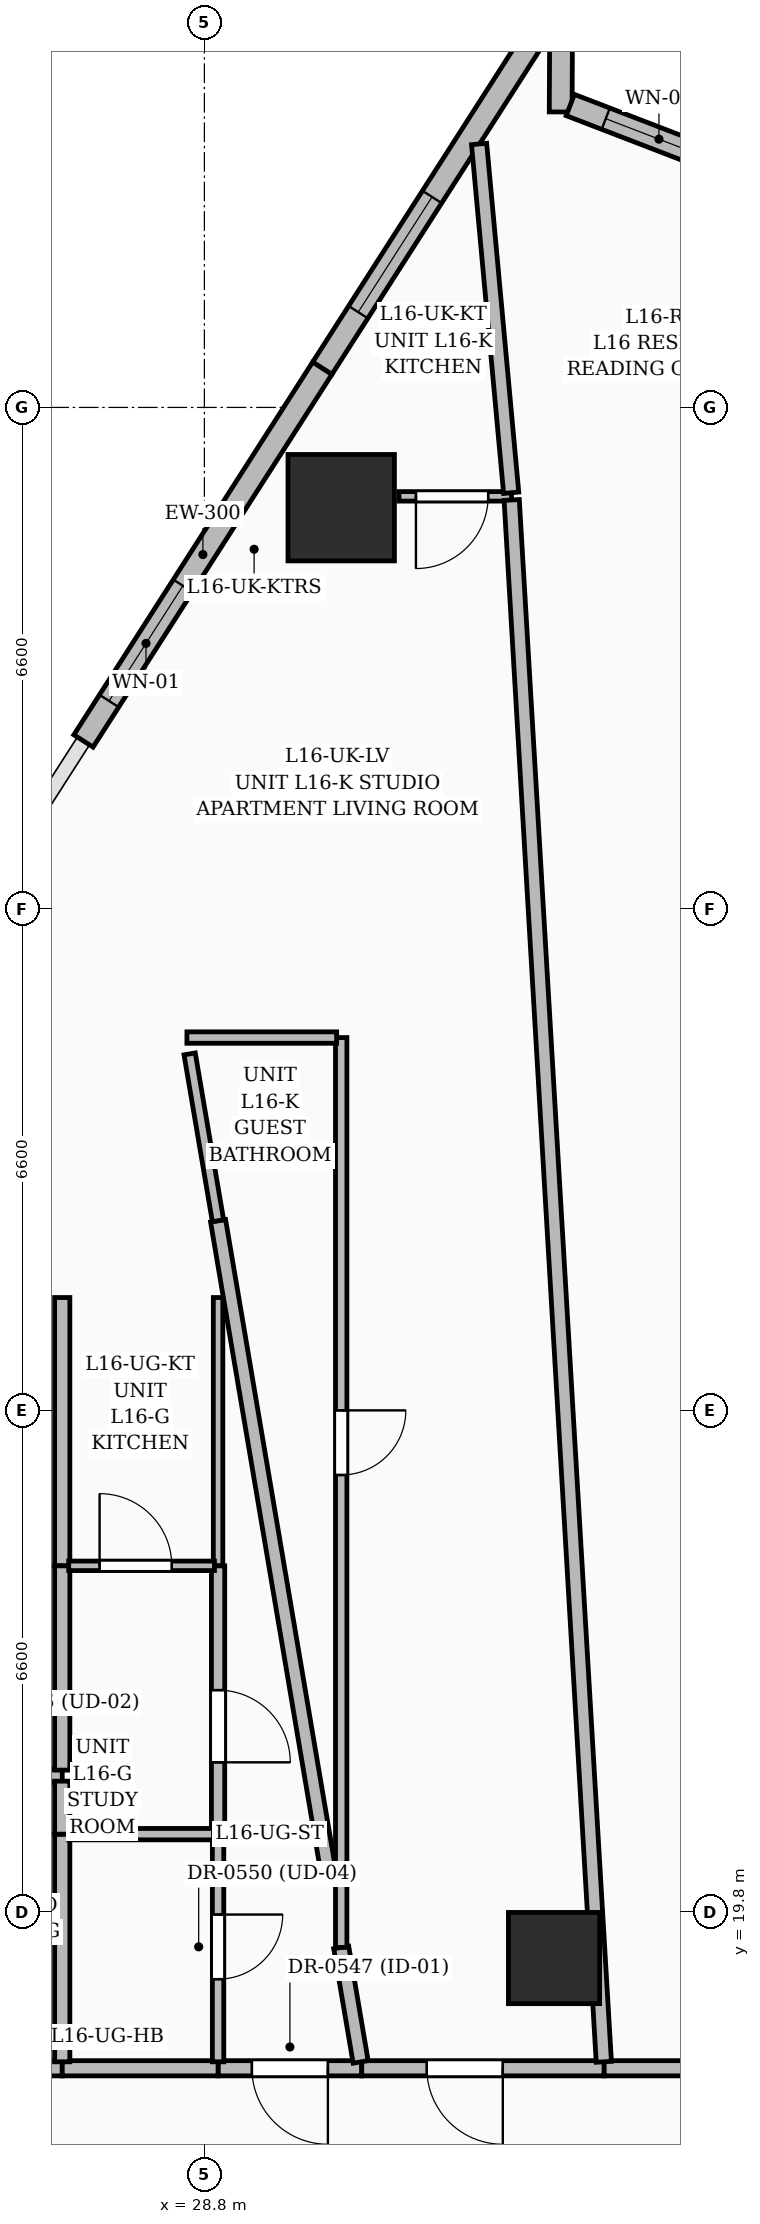
"""IFC4 building model, lengths in metres.
Left out: names, types, materials, properties, quantities, classifications, styles, units other than length and angle.
Written with IfcOpenShell. Run it as: python <this file> out.ifc"""

import sys

from ifc_helpers import new_model, si_unit, direction, frame, frame_2d, origin, origin_2d, place, context, subcontext, project, spatial, rectangle, extrude, element, fill, save


model = new_model("IFC4")
c1 = context("Model", 3, precision=1e-05, world=origin(), true_north=direction((0.0, 1.0)))
c2 = subcontext(c1, "Body", "Model", "MODEL_VIEW")
j1 = project(units=[si_unit("LENGTHUNIT", "METRE"), si_unit("PLANEANGLEUNIT", "RADIAN")], contexts=[c1])
p1 = place(None, origin())
s1 = spatial("IfcSite", under=j1, at=p1, CompositionType="ELEMENT")
p2 = place(p1, origin())
s2 = spatial("IfcBuilding", under=s1, at=p2, CompositionType="ELEMENT")
p3 = place(p2, frame((0.0, 0.0, 67.8)))
s3 = spatial("IfcBuildingStorey", under=s2, at=p3, CompositionType="ELEMENT", Elevation=67.8)
p4 = place(p3, frame((33.4, 19.2, 0.0), z_axis=(0.0, 0.0, 1.0), x_axis=(1.0, 0.0, 0.0)))
e1 = element("IfcColumn", 1, at=p4, inside=s3, PredefinedType="COLUMN", context=c2, shape_type="SweptSolid", body=[
    extrude(rectangle(XDim=1.2, YDim=1.2, at=origin_2d()), origin(), (0.0, 0.0, 1.0), 3.6),
])
p5 = place(p3, frame((30.6, 38.281, 0.0), z_axis=(0.0, 0.0, 1.0), x_axis=(1.0, 0.0, 0.0)))
e2 = element("IfcColumn", 2, at=p5, inside=s3, PredefinedType="COLUMN", context=c2, shape_type="SweptSolid", body=[
    extrude(rectangle(XDim=1.4, YDim=1.4, at=origin_2d()), origin(), (0.0, 0.0, 1.0), 3.6),
])
p6 = place(p3, frame((27.209, 35.212, 0.0), z_axis=(0.0, 0.0, 1.0), x_axis=(0.539522163193, 0.841971398222, 0.0)))
e3 = element("IfcWall", 3, at=p6, inside=s3, PredefinedType="SOLIDWALL", context=c2, shape_type="SweptSolid", body=[
    extrude(rectangle(XDim=5.826, YDim=0.3, at=frame_2d((2.913, 0.0))), origin(), (0.0, 0.0, 1.0), 3.35),
])
p7 = place(p6, frame((0.625, 0.0, 0.6)))
e4 = element("IfcOpeningElement", 4, at=p7, cuts=e3, PredefinedType="OPENING", context=c2, shape_type="SweptSolid", body=[
    extrude(rectangle(XDim=1.8, YDim=2.1, at=frame_2d((0.9, 1.05))), frame((0.0, 0.16, 0.0), z_axis=(0.0, -1.0, 0.0), x_axis=(1.0, 0.0, 0.0)), (0.0, 0.0, 1.0), 0.32),
])
p8 = place(p3, frame((30.352, 40.117, 0.0), z_axis=(0.0, 0.0, 1.0), x_axis=(0.539522163193, 0.841971398222, 0.0)))
e5 = element("IfcWall", 5, at=p8, inside=s3, PredefinedType="SOLIDWALL", context=c2, shape_type="SweptSolid", body=[
    extrude(rectangle(XDim=5.826, YDim=0.3, at=frame_2d((2.913, 0.0))), origin(), (0.0, 0.0, 1.0), 3.35),
])
p9 = place(p8, frame((0.875, 0.0, 0.6)))
e6 = element("IfcOpeningElement", 6, at=p9, cuts=e5, PredefinedType="OPENING", context=c2, shape_type="SweptSolid", body=[
    extrude(rectangle(XDim=1.8, YDim=2.1, at=frame_2d((0.9, 1.05))), frame((0.0, 0.16, 0.0), z_axis=(0.0, -1.0, 0.0), x_axis=(1.0, 0.0, 0.0)), (0.0, 0.0, 1.0), 0.32),
])
p10 = place(p3, frame((33.493, 44.612, 0.0), z_axis=(0.0, 0.0, 1.0), x_axis=(-0.004991257271, -0.999987543598, 0.0)))
e7 = element("IfcWall", 7, at=p10, inside=s3, PredefinedType="SOLIDWALL", context=c2, shape_type="SweptSolid", body=[
    extrude(rectangle(XDim=1.125, YDim=0.3, at=frame_2d((0.562, 0.0))), origin(), (0.0, 0.0, 1.0), 3.35),
])
p11 = place(p3, frame((33.614, 43.579, 0.0), z_axis=(0.0, 0.0, 1.0), x_axis=(0.933166321884, -0.359444871576, 0.0)))
e8 = element("IfcWall", 8, at=p11, inside=s3, PredefinedType="SOLIDWALL", context=c2, shape_type="SweptSolid", body=[
    extrude(rectangle(XDim=2.985, YDim=0.3, at=frame_2d((1.493, 0.0))), origin(), (0.0, 0.0, 1.0), 3.35),
])
p12 = place(p11, frame((0.5, 0.0, 0.6)))
e9 = element("IfcOpeningElement", 9, at=p12, cuts=e8, PredefinedType="OPENING", context=c2, shape_type="SweptSolid", body=[
    extrude(rectangle(XDim=1.5, YDim=2.1, at=frame_2d((0.75, 1.05))), frame((0.0, 0.16, 0.0), z_axis=(0.0, -1.0, 0.0), x_axis=(1.0, 0.0, 0.0)), (0.0, 0.0, 1.0), 0.32),
])
p13 = place(p3, frame((26.93, 17.75, 0.0), z_axis=(0.0, 0.0, 1.0), x_axis=(-1.0, 0.0, 0.0)))
e10 = element("IfcWall", 10, at=p13, inside=s3, PredefinedType="PARTITIONING", context=c2, shape_type="SweptSolid", body=[
    extrude(rectangle(XDim=5.15, YDim=0.2, at=frame_2d((2.575, 0.0))), origin(), (0.0, 0.0, 1.0), 2.279),
])
p14 = place(p13, frame((2.016, 0.0, 0.0)))
e11 = element("IfcOpeningElement", 11, at=p14, cuts=e10, PredefinedType="OPENING", context=c2, shape_type="SweptSolid", body=[
    extrude(rectangle(XDim=1.0, YDim=2.2, at=frame_2d((0.5, 1.1))), frame((0.0, 0.11, 0.0), z_axis=(0.0, -1.0, 0.0), x_axis=(1.0, 0.0, 0.0)), (0.0, 0.0, 1.0), 0.22),
])
p15 = place(p3, frame((30.87, 17.75, 0.0), z_axis=(0.0, 0.0, 1.0), x_axis=(-1.0, 0.0, 0.0)))
e12 = element("IfcWall", 12, at=p15, inside=s3, PredefinedType="PARTITIONING", context=c2, shape_type="SweptSolid", body=[
    extrude(rectangle(XDim=1.89, YDim=0.2, at=frame_2d((0.945, 0.0))), origin(), (0.0, 0.0, 1.0), 3.35),
])
p16 = place(p15, frame((0.445, 0.0, 0.0)))
e13 = element("IfcOpeningElement", 13, at=p16, cuts=e12, PredefinedType="OPENING", context=c2, shape_type="SweptSolid", body=[
    extrude(rectangle(XDim=1.0, YDim=2.2, at=frame_2d((0.5, 1.1))), frame((0.0, 0.11, 0.0), z_axis=(0.0, -1.0, 0.0), x_axis=(1.0, 0.0, 0.0)), (0.0, 0.0, 1.0), 0.22),
])
p17 = place(p3, frame((28.98, 17.75, 0.0), z_axis=(0.0, 0.0, 1.0), x_axis=(-1.0, 0.0, 0.0)))
e14 = element("IfcWall", 14, at=p17, inside=s3, PredefinedType="PARTITIONING", context=c2, shape_type="SweptSolid", body=[
    extrude(rectangle(XDim=2.05, YDim=0.2, at=frame_2d((1.025, 0.0))), origin(), (0.0, 0.0, 1.0), 2.787),
])
p18 = place(p3, frame((34.06, 17.75, 0.0), z_axis=(0.0, 0.0, 1.0), x_axis=(-1.0, 0.0, 0.0)))
e15 = element("IfcWall", 15, at=p18, inside=s3, PredefinedType="PARTITIONING", context=c2, shape_type="SweptSolid", body=[
    extrude(rectangle(XDim=3.19, YDim=0.2, at=frame_2d((1.595, 0.0))), origin(), (0.0, 0.0, 1.0), 2.309),
])
p19 = place(p18, frame((1.334, 0.0, 0.0)))
e16 = element("IfcOpeningElement", 16, at=p19, cuts=e15, PredefinedType="OPENING", context=c2, shape_type="SweptSolid", body=[
    extrude(rectangle(XDim=1.0, YDim=2.2, at=frame_2d((0.5, 1.1))), frame((0.0, 0.11, 0.0), z_axis=(0.0, -1.0, 0.0), x_axis=(1.0, 0.0, 0.0)), (0.0, 0.0, 1.0), 0.22),
])
p20 = place(p3, frame((37.25, 17.75, 0.0), z_axis=(0.0, 0.0, 1.0), x_axis=(-1.0, 0.0, 0.0)))
e17 = element("IfcWall", 17, at=p20, inside=s3, PredefinedType="PARTITIONING", context=c2, shape_type="SweptSolid", body=[
    extrude(rectangle(XDim=3.19, YDim=0.2, at=frame_2d((1.595, 0.0))), origin(), (0.0, 0.0, 1.0), 2.309),
])
p21 = place(p20, frame((1.086, 0.0, 0.0)))
e18 = element("IfcOpeningElement", 18, at=p21, cuts=e17, PredefinedType="OPENING", context=c2, shape_type="SweptSolid", body=[
    extrude(rectangle(XDim=0.9, YDim=2.1, at=frame_2d((0.45, 1.05))), frame((0.0, 0.11, 0.0), z_axis=(0.0, -1.0, 0.0), x_axis=(1.0, 0.0, 0.0)), (0.0, 0.0, 1.0), 0.22),
])
p22 = place(p3, frame((26.93, 21.6, 0.0), z_axis=(0.0, 0.0, 1.0), x_axis=(-1.0, 0.0, 0.0)))
e19 = element("IfcWall", 19, at=p22, inside=s3, PredefinedType="PARTITIONING", context=c2, shape_type="SweptSolid", body=[
    extrude(rectangle(XDim=2.57, YDim=0.175, at=frame_2d((1.285, 0.0))), origin(), (0.0, 0.0, 1.0), 3.35),
])
p23 = place(p22, frame((0.835, 0.0, 0.0)))
e20 = element("IfcOpeningElement", 20, at=p23, cuts=e19, PredefinedType="OPENING", context=c2, shape_type="SweptSolid", body=[
    extrude(rectangle(XDim=0.9, YDim=2.15, at=frame_2d((0.45, 1.075))), frame((0.0, 0.097, 0.0), z_axis=(0.0, -1.0, 0.0), x_axis=(1.0, 0.0, 0.0)), (0.0, 0.0, 1.0), 0.195),
])
p24 = place(p3, frame((26.93, 17.835, 0.0), z_axis=(0.0, 0.0, 1.0), x_axis=(0.0, 1.0, 0.0)))
e21 = element("IfcWall", 21, at=p24, inside=s3, PredefinedType="PARTITIONING", context=c2, shape_type="SweptSolid", body=[
    extrude(rectangle(XDim=2.995, YDim=0.2, at=frame_2d((1.498, 0.0))), origin(), (0.0, 0.0, 1.0), 2.787),
])
p25 = place(p3, frame((26.93, 20.83, 0.0), z_axis=(0.0, 0.0, 1.0), x_axis=(0.0, 1.0, 0.0)))
e22 = element("IfcWall", 22, at=p25, inside=s3, PredefinedType="PARTITIONING", context=c2, shape_type="SweptSolid", body=[
    extrude(rectangle(XDim=0.698, YDim=0.2, at=frame_2d((0.349, 0.0))), origin(), (0.0, 0.0, 1.0), 2.787),
])
p26 = place(p3, frame((26.93, 24.36, 0.0), z_axis=(0.0, 0.0, 1.0), x_axis=(0.0, 1.0, 0.0)))
e23 = element("IfcWall", 23, at=p26, inside=s3, PredefinedType="PARTITIONING", context=c2, shape_type="SweptSolid", body=[
    extrude(rectangle(XDim=3.53, YDim=0.2, at=frame_2d((1.765, 0.0))), origin(), (0.0, 0.0, 1.0), 2.279),
])
p27 = place(p3, frame((26.93, 21.673, 0.0), z_axis=(0.0, 0.0, 1.0), x_axis=(0.0, 1.0, 0.0)))
e24 = element("IfcWall", 24, at=p27, inside=s3, PredefinedType="PARTITIONING", context=c2, shape_type="SweptSolid", body=[
    extrude(rectangle(XDim=2.688, YDim=0.2, at=frame_2d((1.344, 0.0))), origin(), (0.0, 0.0, 1.0), 3.35),
])
p28 = place(p3, frame((28.98, 20.83, 0.0), z_axis=(0.0, 0.0, 1.0), x_axis=(0.0, -1.0, 0.0)))
e25 = element("IfcWall", 25, at=p28, inside=s3, PredefinedType="PARTITIONING", context=c2, shape_type="SweptSolid", body=[
    extrude(rectangle(XDim=2.995, YDim=0.15, at=frame_2d((1.498, 0.0))), origin(), (0.0, 0.0, 1.0), 2.787),
])
p29 = place(p28, frame((1.058, 0.0, 0.0)))
e26 = element("IfcOpeningElement", 26, at=p29, cuts=e25, PredefinedType="OPENING", context=c2, shape_type="SweptSolid", body=[
    extrude(rectangle(XDim=0.85, YDim=2.1, at=frame_2d((0.425, 1.05))), frame((0.0, 0.085, 0.0), z_axis=(0.0, -1.0, 0.0), x_axis=(1.0, 0.0, 0.0)), (0.0, 0.0, 1.0), 0.17),
])
p30 = place(p3, frame((28.98, 27.89, 0.0), z_axis=(0.0, 0.0, 1.0), x_axis=(0.0, -1.0, 0.0)))
e27 = element("IfcWall", 27, at=p30, inside=s3, PredefinedType="PARTITIONING", context=c2, shape_type="SweptSolid", body=[
    extrude(rectangle(XDim=3.53, YDim=0.125, at=frame_2d((1.765, 0.0))), origin(), (0.0, 0.0, 1.0), 3.35),
])
p31 = place(p3, frame((28.98, 24.36, 0.0), z_axis=(0.0, 0.0, 1.0), x_axis=(0.0, -1.0, 0.0)))
e28 = element("IfcWall", 28, at=p31, inside=s3, PredefinedType="PARTITIONING", context=c2, shape_type="SweptSolid", body=[
    extrude(rectangle(XDim=3.53, YDim=0.175, at=frame_2d((1.765, 0.0))), origin(), (0.0, 0.0, 1.0), 2.279),
])
p32 = place(p31, frame((1.635, 0.0, 0.0)))
e29 = element("IfcOpeningElement", 29, at=p32, cuts=e28, PredefinedType="OPENING", context=c2, shape_type="SweptSolid", body=[
    extrude(rectangle(XDim=0.95, YDim=2.2, at=frame_2d((0.475, 1.1))), frame((0.0, 0.097, 0.0), z_axis=(0.0, -1.0, 0.0), x_axis=(1.0, 0.0, 0.0)), (0.0, 0.0, 1.0), 0.195),
])
p33 = place(p3, frame((30.856, 17.834, 0.0), z_axis=(0.0, 0.0, 1.0), x_axis=(-0.167300412549, 0.98590596507, 0.0)))
e30 = element("IfcWall", 30, at=p33, inside=s3, PredefinedType="PARTITIONING", context=c2, shape_type="SweptSolid", body=[
    extrude(rectangle(XDim=1.528, YDim=0.2, at=frame_2d((0.764, 0.0))), origin(), (0.0, 0.0, 1.0), 3.35),
])
p34 = place(p3, frame((30.44, 20.284, 0.0), z_axis=(0.0, 0.0, 1.0), x_axis=(-0.167066803371, 0.98594557822, 0.0)))
e31 = element("IfcWall", 31, at=p34, inside=s3, PredefinedType="PARTITIONING", context=c2, shape_type="SweptSolid", body=[
    extrude(rectangle(XDim=8.739, YDim=0.2, at=frame_2d((4.369, 0.0))), origin(), (0.0, 0.0, 1.0), 2.279),
])
p35 = place(p3, frame((28.92, 20.83, 0.0), z_axis=(0.0, 0.0, 1.0), x_axis=(-1.0, 0.0, 0.0)))
e32 = element("IfcWall", 32, at=p35, inside=s3, PredefinedType="PARTITIONING", context=c2, shape_type="SweptSolid", body=[
    extrude(rectangle(XDim=1.905, YDim=0.15, at=frame_2d((0.953, 0.0))), origin(), (0.0, 0.0, 1.0), 3.35),
])
p36 = place(p3, frame((27.015, 24.36, 0.0), z_axis=(0.0, 0.0, 1.0), x_axis=(1.0, 0.0, 0.0)))
e33 = element("IfcWall", 33, at=p36, inside=s3, PredefinedType="PARTITIONING", context=c2, shape_type="SweptSolid", body=[
    extrude(rectangle(XDim=1.918, YDim=0.125, at=frame_2d((0.959, 0.0))), origin(), (0.0, 0.0, 1.0), 2.279),
])
p37 = place(p36, frame((0.406, 0.0, 0.0)))
e34 = element("IfcOpeningElement", 34, at=p37, cuts=e33, PredefinedType="OPENING", context=c2, shape_type="SweptSolid", body=[
    extrude(rectangle(XDim=0.95, YDim=2.2, at=frame_2d((0.475, 1.1))), frame((0.0, 0.072, 0.0), z_axis=(0.0, -1.0, 0.0), x_axis=(1.0, 0.0, 0.0)), (0.0, 0.0, 1.0), 0.145),
])
p38 = place(p3, frame((30.6, 31.31, 0.0), z_axis=(0.0, 0.0, 1.0), x_axis=(0.0, -1.0, 0.0)))
e35 = element("IfcWall", 35, at=p38, inside=s3, PredefinedType="PARTITIONING", context=c2, shape_type="SweptSolid", body=[
    extrude(rectangle(XDim=11.97, YDim=0.15, at=frame_2d((5.985, 0.0))), origin(), (0.0, 0.0, 1.0), 2.279),
])
p39 = place(p38, frame((4.905, 0.0, 0.0)))
e36 = element("IfcOpeningElement", 36, at=p39, cuts=e35, PredefinedType="OPENING", context=c2, shape_type="SweptSolid", body=[
    extrude(rectangle(XDim=0.85, YDim=2.1, at=frame_2d((0.425, 1.05))), frame((0.0, 0.085, 0.0), z_axis=(0.0, -1.0, 0.0), x_axis=(1.0, 0.0, 0.0)), (0.0, 0.0, 1.0), 0.17),
])
p40 = place(p3, frame((32.84, 38.43, 0.0), z_axis=(0.0, 0.0, 1.0), x_axis=(-1.0, 0.0, 0.0)))
e37 = element("IfcWall", 37, at=p40, inside=s3, PredefinedType="PARTITIONING", context=c2, shape_type="SweptSolid", body=[
    extrude(rectangle(XDim=1.48, YDim=0.125, at=frame_2d((0.74, 0.0))), origin(), (0.0, 0.0, 1.0), 2.37),
])
p41 = place(p40, frame((0.307, 0.0, 0.0)))
e38 = element("IfcOpeningElement", 38, at=p41, cuts=e37, PredefinedType="OPENING", context=c2, shape_type="SweptSolid", body=[
    extrude(rectangle(XDim=0.95, YDim=2.2, at=frame_2d((0.475, 1.1))), frame((0.0, 0.072, 0.0), z_axis=(0.0, -1.0, 0.0), x_axis=(1.0, 0.0, 0.0)), (0.0, 0.0, 1.0), 0.145),
])
p42 = place(p3, frame((34.055, 17.835, 0.0), z_axis=(0.0, 0.0, 1.0), x_axis=(-0.058890284917, 0.998264461124, 0.0)))
e39 = element("IfcWall", 39, at=p42, inside=s3, PredefinedType="PARTITIONING", context=c2, shape_type="SweptSolid", body=[
    extrude(rectangle(XDim=20.583, YDim=0.2, at=frame_2d((10.292, 0.0))), origin(), (0.0, 0.0, 1.0), 2.279),
])
p43 = place(p3, frame((30.54, 31.31, 0.0), z_axis=(0.0, 0.0, 1.0), x_axis=(-1.0, 0.0, 0.0)))
e40 = element("IfcWall", 40, at=p43, inside=s3, PredefinedType="PARTITIONING", context=c2, shape_type="SweptSolid", body=[
    extrude(rectangle(XDim=1.97, YDim=0.15, at=frame_2d((0.985, 0.0))), origin(), (0.0, 0.0, 1.0), 2.787),
])
p44 = place(p3, frame((32.836, 38.477, 0.0), z_axis=(0.0, 0.0, 1.0), x_axis=(-0.091605755033, 0.995795353295, 0.0)))
e41 = element("IfcWall", 41, at=p44, inside=s3, PredefinedType="PARTITIONING", context=c2, shape_type="SweptSolid", body=[
    extrude(rectangle(XDim=4.608, YDim=0.2, at=frame_2d((2.304, 0.0))), origin(), (0.0, 0.0, 1.0), 2.37),
])
p45 = place(p3, frame((28.606, 31.095, 0.0), z_axis=(0.0, 0.0, 1.0), x_axis=(0.167545405698, -0.985864360361, 0.0)))
e42 = element("IfcWall", 42, at=p45, inside=s3, PredefinedType="PARTITIONING", context=c2, shape_type="SweptSolid", body=[
    extrude(rectangle(XDim=2.227, YDim=0.15, at=frame_2d((1.113, 0.0))), origin(), (0.0, 0.0, 1.0), 2.787),
])
p46 = place(p7, origin())
e43 = element("IfcWindow", 43, at=p46, inside=s3, PartitioningType="SINGLE_PANEL", PredefinedType="WINDOW", context=c2, shape_type="SweptSolid", body=[
    extrude(rectangle(XDim=1.8, YDim=2.1, at=frame_2d((0.9, 1.05))), frame((0.0, 0.03, 0.0), z_axis=(0.0, -1.0, 0.0), x_axis=(1.0, 0.0, 0.0)), (0.0, 0.0, 1.0), 0.06),
])
fill(e4, e43)
p47 = place(p9, origin())
e44 = element("IfcWindow", 44, at=p47, inside=s3, PartitioningType="SINGLE_PANEL", PredefinedType="WINDOW", context=c2, shape_type="SweptSolid", body=[
    extrude(rectangle(XDim=1.8, YDim=2.1, at=frame_2d((0.9, 1.05))), frame((0.0, 0.03, 0.0), z_axis=(0.0, -1.0, 0.0), x_axis=(1.0, 0.0, 0.0)), (0.0, 0.0, 1.0), 0.06),
])
fill(e6, e44)
p48 = place(p12, origin())
e45 = element("IfcWindow", 45, at=p48, inside=s3, PartitioningType="SINGLE_PANEL", PredefinedType="WINDOW", context=c2, shape_type="SweptSolid", body=[
    extrude(rectangle(XDim=1.5, YDim=2.1, at=frame_2d((0.75, 1.05))), frame((0.0, 0.03, 0.0), z_axis=(0.0, -1.0, 0.0), x_axis=(1.0, 0.0, 0.0)), (0.0, 0.0, 1.0), 0.06),
])
fill(e9, e45)
p49 = place(p16, origin())
e46 = element("IfcDoor", 46, at=p49, inside=s3, OperationType="SINGLE_SWING_LEFT", PredefinedType="DOOR", context=c2, shape_type="SweptSolid", body=[
    extrude(rectangle(XDim=1.0, YDim=2.2, at=frame_2d((0.5, 1.1))), frame((0.0, 0.025, 0.0), z_axis=(0.0, -1.0, 0.0), x_axis=(1.0, 0.0, 0.0)), (0.0, 0.0, 1.0), 0.05),
])
fill(e13, e46)
p50 = place(p37, origin())
e47 = element("IfcDoor", 47, at=p50, inside=s3, OperationType="SINGLE_SWING_LEFT", PredefinedType="DOOR", context=c2, shape_type="SweptSolid", body=[
    extrude(rectangle(XDim=0.95, YDim=2.2, at=frame_2d((0.475, 1.1))), frame((0.0, 0.025, 0.0), z_axis=(0.0, -1.0, 0.0), x_axis=(1.0, 0.0, 0.0)), (0.0, 0.0, 1.0), 0.05),
])
fill(e34, e47)
p51 = place(p32, origin())
e48 = element("IfcDoor", 48, at=p51, inside=s3, OperationType="SINGLE_SWING_RIGHT", PredefinedType="DOOR", context=c2, shape_type="SweptSolid", body=[
    extrude(rectangle(XDim=0.95, YDim=2.2, at=frame_2d((0.475, 1.1))), frame((0.0, 0.025, 0.0), z_axis=(0.0, -1.0, 0.0), x_axis=(1.0, 0.0, 0.0)), (0.0, 0.0, 1.0), 0.05),
])
fill(e29, e48)
p52 = place(p29, origin())
e49 = element("IfcDoor", 49, at=p52, inside=s3, OperationType="SINGLE_SWING_LEFT", PredefinedType="DOOR", context=c2, shape_type="SweptSolid", body=[
    extrude(rectangle(XDim=0.85, YDim=2.1, at=frame_2d((0.425, 1.05))), frame((0.0, 0.025, 0.0), z_axis=(0.0, -1.0, 0.0), x_axis=(1.0, 0.0, 0.0)), (0.0, 0.0, 1.0), 0.05),
])
fill(e26, e49)
p53 = place(p19, origin())
e50 = element("IfcDoor", 50, at=p53, inside=s3, OperationType="SINGLE_SWING_LEFT", PredefinedType="DOOR", context=c2, shape_type="SweptSolid", body=[
    extrude(rectangle(XDim=1.0, YDim=2.2, at=frame_2d((0.5, 1.1))), frame((0.0, 0.025, 0.0), z_axis=(0.0, -1.0, 0.0), x_axis=(1.0, 0.0, 0.0)), (0.0, 0.0, 1.0), 0.05),
])
fill(e16, e50)
p54 = place(p41, origin())
e51 = element("IfcDoor", 51, at=p54, inside=s3, OperationType="SINGLE_SWING_RIGHT", PredefinedType="DOOR", context=c2, shape_type="SweptSolid", body=[
    extrude(rectangle(XDim=0.95, YDim=2.2, at=frame_2d((0.475, 1.1))), frame((0.0, 0.025, 0.0), z_axis=(0.0, -1.0, 0.0), x_axis=(1.0, 0.0, 0.0)), (0.0, 0.0, 1.0), 0.05),
])
fill(e38, e51)
p55 = place(p39, origin())
e52 = element("IfcDoor", 52, at=p55, inside=s3, OperationType="SINGLE_SWING_LEFT", PredefinedType="DOOR", context=c2, shape_type="SweptSolid", body=[
    extrude(rectangle(XDim=0.85, YDim=2.1, at=frame_2d((0.425, 1.05))), frame((0.0, 0.025, 0.0), z_axis=(0.0, -1.0, 0.0), x_axis=(1.0, 0.0, 0.0)), (0.0, 0.0, 1.0), 0.05),
])
fill(e36, e52)
save(model, sys.argv[1])
